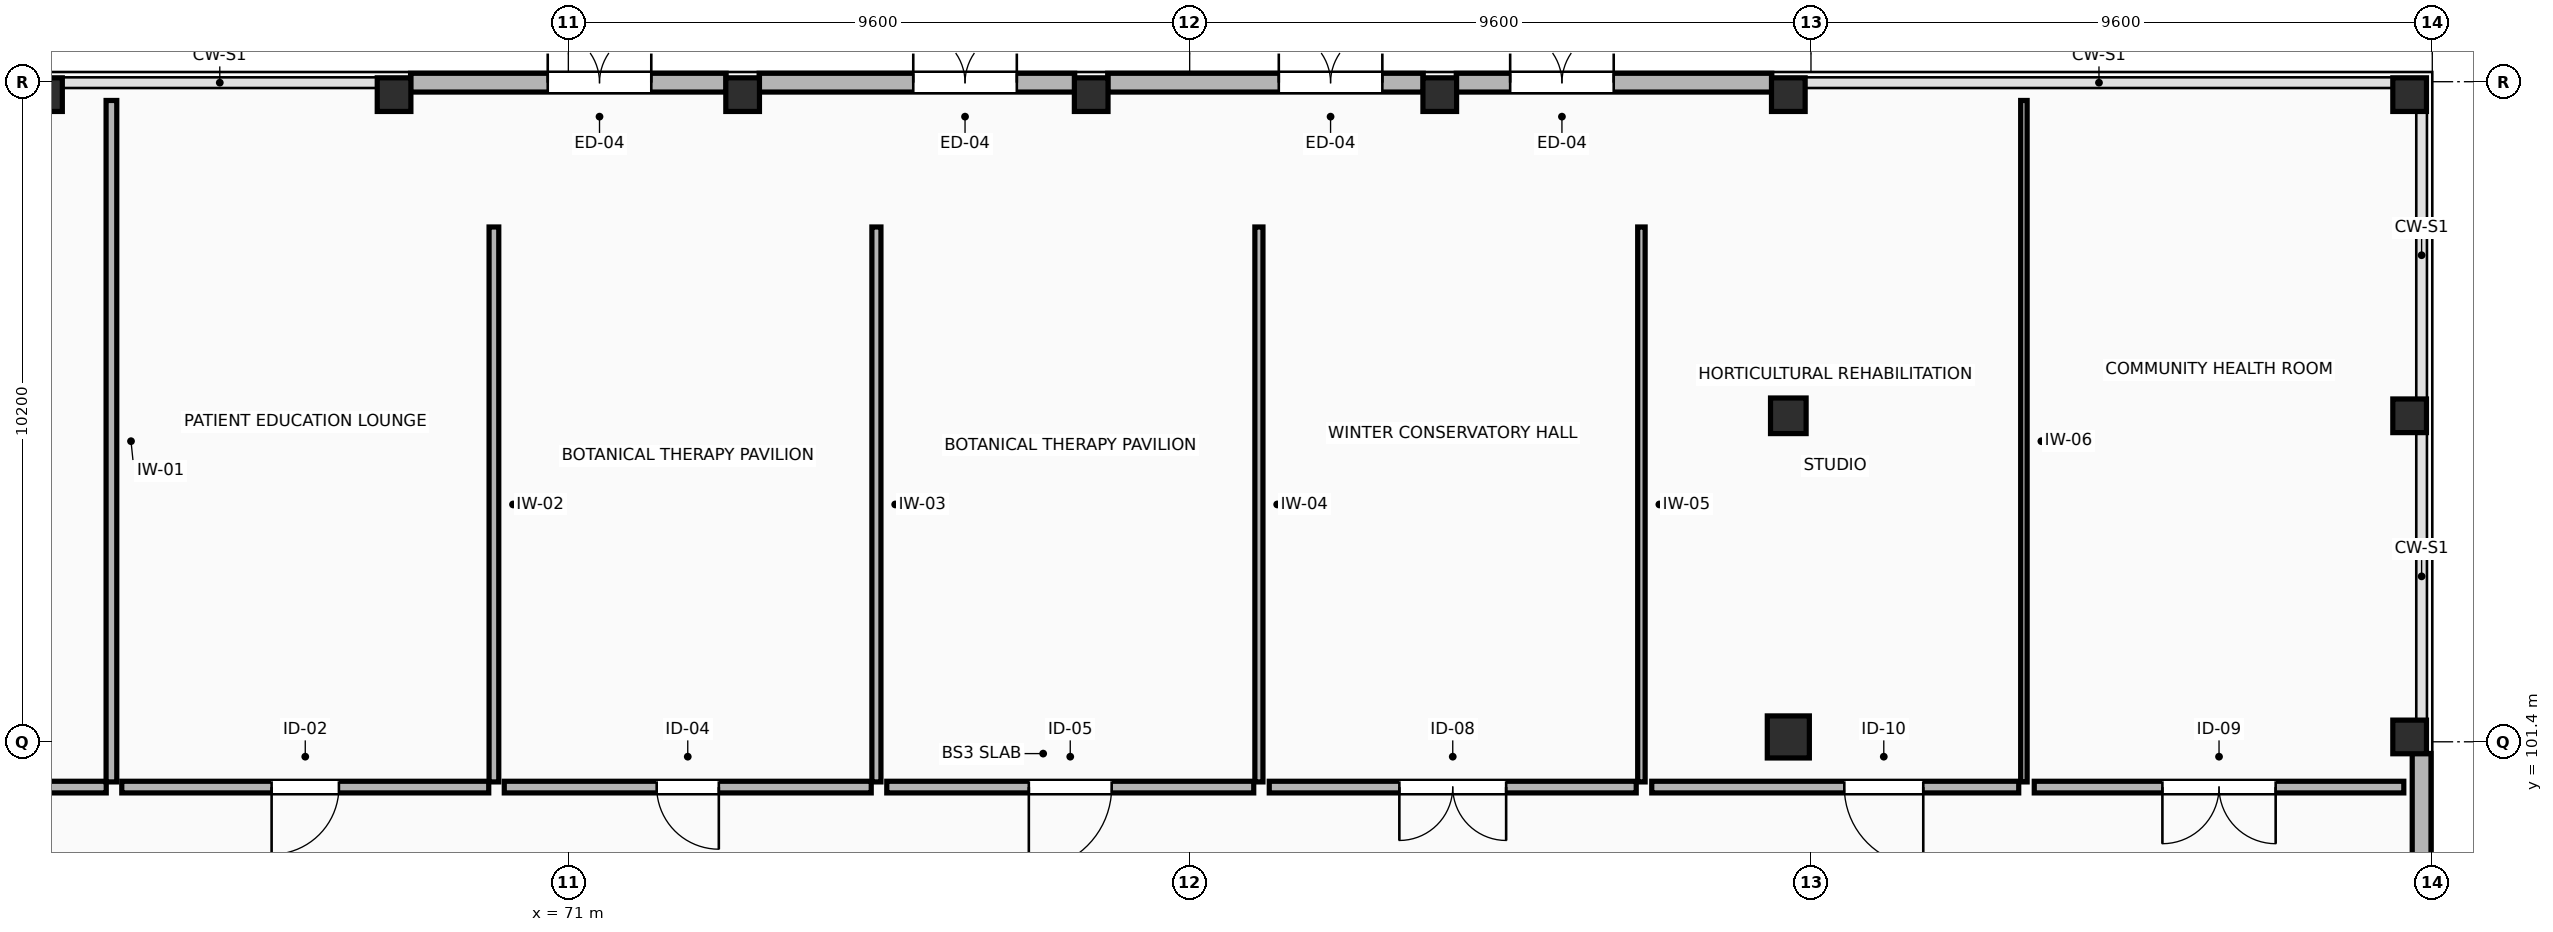
"""IFC4 building model, lengths in metres.
Left out: names, types, materials, properties, quantities, classifications, styles, units other than length and angle.
Written with IfcOpenShell. Run it as: python <this file> out.ifc"""

import sys

from ifc_helpers import new_model, si_unit, direction, frame, frame_2d, origin, origin_2d, place, context, subcontext, project, spatial, rectangle, circle, extrude, element, fill, save


model = new_model("IFC4")
c1 = context("Model", 3, precision=1e-05, world=origin(), true_north=direction((0.0, 1.0)))
c2 = subcontext(c1, "Body", "Model", "MODEL_VIEW")
j1 = project(units=[si_unit("LENGTHUNIT", "METRE"), si_unit("PLANEANGLEUNIT", "RADIAN")], contexts=[c1])
p1 = place(None, origin())
s1 = spatial("IfcSite", under=j1, at=p1, CompositionType="ELEMENT")
p2 = place(p1, origin())
s2 = spatial("IfcBuilding", under=s1, at=p2, CompositionType="ELEMENT")
p3 = place(p2, origin())
s3 = spatial("IfcBuildingStorey", under=s2, at=p3, CompositionType="ELEMENT", Elevation=0.0)
for number, where, z_axis, x_axis in (
    (1, (62.921, 111.4, -1.75), (0.0, 0.0, 1.0), (1.0, 0.0, 0.0)),
    (2, (68.307, 111.4, -1.75), (0.0, 0.0, 1.0), (1.0, 0.0, 0.0)),
    (3, (73.693, 111.4, -1.75), (0.0, 0.0, 1.0), (1.0, 0.0, 0.0)),
    (4, (79.079, 111.4, -1.75), (0.0, 0.0, 1.0), (1.0, 0.0, 0.0)),
    (5, (84.464, 111.4, -1.75), (0.0, 0.0, 1.0), (1.0, 0.0, 0.0)),
):
    element("IfcColumn", number, at=place(p3, frame(where, z_axis=z_axis, x_axis=x_axis)), inside=s3, PredefinedType="COLUMN", context=c2, shape_type="SweptSolid", body=[
        extrude(circle(Radius=0.26, at=origin_2d()), origin(), (0.0, 0.0, 1.0), 7.15),
    ])
p4 = place(p3, frame((89.85, 101.475, -1.75), z_axis=(0.0, 0.0, 1.0), x_axis=(1.0, 0.0, 0.0)))
e6 = element("IfcColumn", 6, at=p4, inside=s3, PredefinedType="COLUMN", context=c2, shape_type="SweptSolid", body=[
    extrude(rectangle(XDim=0.65, YDim=0.65, at=origin_2d()), origin(), (0.0, 0.0, 1.0), 7.15),
])
p5 = place(p3, frame((89.85, 106.438, -1.75), z_axis=(0.0, 0.0, 1.0), x_axis=(1.0, 0.0, 0.0)))
e7 = element("IfcColumn", 7, at=p5, inside=s3, PredefinedType="COLUMN", context=c2, shape_type="SweptSolid", body=[
    extrude(rectangle(XDim=0.55, YDim=0.55, at=origin_2d()), origin(), (0.0, 0.0, 1.0), 7.15),
])
for number, where, z_axis, x_axis in (
    (8, (89.85, 111.4, -1.75), (0.0, 0.0, 1.0), (1.0, 0.0, 0.0)),
    (9, (99.45, 101.475, -1.75), (0.0, 0.0, 1.0), (1.0, 0.0, 0.0)),
    (10, (99.45, 106.438, -1.75), (0.0, 0.0, 1.0), (1.0, 0.0, 0.0)),
    (11, (99.45, 111.4, -1.75), (0.0, 0.0, 1.0), (1.0, 0.0, 0.0)),
):
    element("IfcColumn", number, at=place(p3, frame(where, z_axis=z_axis, x_axis=x_axis)), inside=s3, PredefinedType="COLUMN", context=c2, shape_type="SweptSolid", body=[
        extrude(circle(Radius=0.26, at=origin_2d()), origin(), (0.0, 0.0, 1.0), 7.15),
    ])
p6 = place(p3, frame((99.635, 96.768, 0.0), z_axis=(0.0, 0.0, 1.0), x_axis=(0.0, 1.0, 0.0)))
e12 = element("IfcWall", 12, at=p6, inside=s3, PredefinedType="STANDARD", context=c2, shape_type="SweptSolid", body=[
    extrude(rectangle(XDim=4.452, YDim=0.29, at=frame_2d((2.226, 0.0))), origin(), (0.0, 0.0, 1.0), 4.67),
])
p7 = place(p3, frame((89.595, 111.585, 0.0), z_axis=(0.0, 0.0, 1.0), x_axis=(-1.0, 0.0, 0.0)))
e13 = element("IfcWall", 13, at=p7, inside=s3, PredefinedType="STANDARD", context=c2, shape_type="SweptSolid", body=[
    extrude(rectangle(XDim=4.876, YDim=0.29, at=frame_2d((2.438, 0.0))), origin(), (0.0, 0.0, 1.0), 4.265),
])
p8 = place(p7, frame((2.443, 0.0, 0.0)))
e14 = element("IfcOpeningElement", 14, at=p8, cuts=e13, PredefinedType="OPENING", context=c2, shape_type="SweptSolid", body=[
    extrude(rectangle(XDim=1.6, YDim=2.25, at=frame_2d((0.8, 1.125))), frame((0.0, 0.155, 0.0), z_axis=(0.0, -1.0, 0.0), x_axis=(1.0, 0.0, 0.0)), (0.0, 0.0, 1.0), 0.31),
])
p9 = place(p3, frame((84.209, 111.585, 0.0), z_axis=(0.0, 0.0, 1.0), x_axis=(-1.0, 0.0, 0.0)))
e15 = element("IfcWall", 15, at=p9, inside=s3, PredefinedType="STANDARD", context=c2, shape_type="SweptSolid", body=[
    extrude(rectangle(XDim=4.876, YDim=0.29, at=frame_2d((2.438, 0.0))), origin(), (0.0, 0.0, 1.0), 5.125),
])
p10 = place(p9, frame((0.632, 0.0, 0.0)))
e16 = element("IfcOpeningElement", 16, at=p10, cuts=e15, PredefinedType="OPENING", context=c2, shape_type="SweptSolid", body=[
    extrude(rectangle(XDim=1.6, YDim=2.25, at=frame_2d((0.8, 1.125))), frame((0.0, 0.155, 0.0), z_axis=(0.0, -1.0, 0.0), x_axis=(1.0, 0.0, 0.0)), (0.0, 0.0, 1.0), 0.31),
])
p11 = place(p3, frame((78.823, 111.585, 0.0), z_axis=(0.0, 0.0, 1.0), x_axis=(-1.0, 0.0, 0.0)))
e17 = element("IfcWall", 17, at=p11, inside=s3, PredefinedType="STANDARD", context=c2, shape_type="SweptSolid", body=[
    extrude(rectangle(XDim=4.875, YDim=0.29, at=frame_2d((2.438, 0.0))), origin(), (0.0, 0.0, 1.0), 5.125),
])
p12 = place(p11, frame((0.894, 0.0, 0.0)))
e18 = element("IfcOpeningElement", 18, at=p12, cuts=e17, PredefinedType="OPENING", context=c2, shape_type="SweptSolid", body=[
    extrude(rectangle(XDim=1.6, YDim=2.25, at=frame_2d((0.8, 1.125))), frame((0.0, 0.155, 0.0), z_axis=(0.0, -1.0, 0.0), x_axis=(1.0, 0.0, 0.0)), (0.0, 0.0, 1.0), 0.31),
])
p13 = place(p3, frame((73.438, 111.585, 0.0), z_axis=(0.0, 0.0, 1.0), x_axis=(-1.0, 0.0, 0.0)))
e19 = element("IfcWall", 19, at=p13, inside=s3, PredefinedType="STANDARD", context=c2, shape_type="SweptSolid", body=[
    extrude(rectangle(XDim=4.876, YDim=0.29, at=frame_2d((2.438, 0.0))), origin(), (0.0, 0.0, 1.0), 5.125),
])
p14 = place(p13, frame((1.156, 0.0, 0.0)))
e20 = element("IfcOpeningElement", 20, at=p14, cuts=e19, PredefinedType="OPENING", context=c2, shape_type="SweptSolid", body=[
    extrude(rectangle(XDim=1.6, YDim=2.25, at=frame_2d((0.8, 1.125))), frame((0.0, 0.155, 0.0), z_axis=(0.0, -1.0, 0.0), x_axis=(1.0, 0.0, 0.0)), (0.0, 0.0, 1.0), 0.31),
])
p15 = place(p3, frame((63.86, 100.7, 0.0), z_axis=(0.0, 0.0, 1.0), x_axis=(-1.0, 0.0, 0.0)))
e21 = element("IfcWall", 21, at=p15, inside=s3, PredefinedType="PARTITIONING", context=c2, shape_type="SweptSolid", body=[
    extrude(rectangle(XDim=5.67, YDim=0.18, at=frame_2d((2.835, 0.0))), origin(), (0.0, 0.0, 1.0), 5.125),
])
p16 = place(p15, frame((1.96, 0.0, 0.0)))
e22 = element("IfcOpeningElement", 22, at=p16, cuts=e21, PredefinedType="OPENING", context=c2, shape_type="SweptSolid", body=[
    extrude(rectangle(XDim=1.75, YDim=2.35, at=frame_2d((0.875, 1.175))), frame((0.0, 0.1, 0.0), z_axis=(0.0, -1.0, 0.0), x_axis=(1.0, 0.0, 0.0)), (0.0, 0.0, 1.0), 0.2),
])
p17 = place(p3, frame((63.94, 111.31, 0.0), z_axis=(0.0, 0.0, 1.0), x_axis=(0.0, -1.0, 0.0)))
e23 = element("IfcWall", 23, at=p17, inside=s3, PredefinedType="PARTITIONING", context=c2, shape_type="SweptSolid", body=[
    extrude(rectangle(XDim=10.53, YDim=0.165, at=frame_2d((5.265, 0.0))), origin(), (0.0, 0.0, 1.0), 5.125),
])
p18 = place(p3, frame((69.77, 100.7, 0.0), z_axis=(0.0, 0.0, 1.0), x_axis=(-1.0, 0.0, 0.0)))
e24 = element("IfcWall", 24, at=p18, inside=s3, PredefinedType="PARTITIONING", context=c2, shape_type="SweptSolid", body=[
    extrude(rectangle(XDim=5.67, YDim=0.18, at=frame_2d((2.835, 0.0))), origin(), (0.0, 0.0, 1.0), 5.125),
])
p19 = place(p18, frame((2.315, 0.0, 0.0)))
e25 = element("IfcOpeningElement", 25, at=p19, cuts=e24, PredefinedType="OPENING", context=c2, shape_type="SweptSolid", body=[
    extrude(rectangle(XDim=1.04, YDim=2.15, at=frame_2d((0.52, 1.075))), frame((0.0, 0.1, 0.0), z_axis=(0.0, -1.0, 0.0), x_axis=(1.0, 0.0, 0.0)), (0.0, 0.0, 1.0), 0.2),
])
p20 = place(p3, frame((69.85, 109.355, 0.0), z_axis=(0.0, 0.0, 1.0), x_axis=(0.0, -1.0, 0.0)))
e26 = element("IfcWall", 26, at=p20, inside=s3, PredefinedType="PARTITIONING", context=c2, shape_type="SweptSolid", body=[
    extrude(rectangle(XDim=8.575, YDim=0.15, at=frame_2d((4.288, 0.0))), origin(), (0.0, 0.0, 1.0), 5.125),
])
p21 = place(p3, frame((75.68, 100.7, 0.0), z_axis=(0.0, 0.0, 1.0), x_axis=(-1.0, 0.0, 0.0)))
e27 = element("IfcWall", 27, at=p21, inside=s3, PredefinedType="PARTITIONING", context=c2, shape_type="SweptSolid", body=[
    extrude(rectangle(XDim=5.67, YDim=0.18, at=frame_2d((2.835, 0.0))), origin(), (0.0, 0.0, 1.0), 5.125),
])
p22 = place(p21, frame((2.355, 0.0, 0.0)))
e28 = element("IfcOpeningElement", 28, at=p22, cuts=e27, PredefinedType="OPENING", context=c2, shape_type="SweptSolid", body=[
    extrude(rectangle(XDim=0.96, YDim=2.1, at=frame_2d((0.48, 1.05))), frame((0.0, 0.1, 0.0), z_axis=(0.0, -1.0, 0.0), x_axis=(1.0, 0.0, 0.0)), (0.0, 0.0, 1.0), 0.2),
])
p23 = place(p3, frame((75.76, 109.355, 0.0), z_axis=(0.0, 0.0, 1.0), x_axis=(0.0, -1.0, 0.0)))
e29 = element("IfcWall", 29, at=p23, inside=s3, PredefinedType="PARTITIONING", context=c2, shape_type="SweptSolid", body=[
    extrude(rectangle(XDim=8.575, YDim=0.14, at=frame_2d((4.288, 0.0))), origin(), (0.0, 0.0, 1.0), 5.125),
])
p24 = place(p3, frame((81.59, 100.7, 0.0), z_axis=(0.0, 0.0, 1.0), x_axis=(-1.0, 0.0, 0.0)))
e30 = element("IfcWall", 30, at=p24, inside=s3, PredefinedType="PARTITIONING", context=c2, shape_type="SweptSolid", body=[
    extrude(rectangle(XDim=5.67, YDim=0.18, at=frame_2d((2.835, 0.0))), origin(), (0.0, 0.0, 1.0), 5.125),
])
p25 = place(p24, frame((2.195, 0.0, 0.0)))
e31 = element("IfcOpeningElement", 31, at=p25, cuts=e30, PredefinedType="OPENING", context=c2, shape_type="SweptSolid", body=[
    extrude(rectangle(XDim=1.28, YDim=2.25, at=frame_2d((0.64, 1.125))), frame((0.0, 0.1, 0.0), z_axis=(0.0, -1.0, 0.0), x_axis=(1.0, 0.0, 0.0)), (0.0, 0.0, 1.0), 0.2),
])
p26 = place(p3, frame((81.67, 109.355, 0.0), z_axis=(0.0, 0.0, 1.0), x_axis=(0.0, -1.0, 0.0)))
e32 = element("IfcWall", 32, at=p26, inside=s3, PredefinedType="PARTITIONING", context=c2, shape_type="SweptSolid", body=[
    extrude(rectangle(XDim=8.575, YDim=0.125, at=frame_2d((4.288, 0.0))), origin(), (0.0, 0.0, 1.0), 5.125),
])
p27 = place(p3, frame((87.5, 100.7, 0.0), z_axis=(0.0, 0.0, 1.0), x_axis=(-1.0, 0.0, 0.0)))
e33 = element("IfcWall", 33, at=p27, inside=s3, PredefinedType="PARTITIONING", context=c2, shape_type="SweptSolid", body=[
    extrude(rectangle(XDim=5.67, YDim=0.18, at=frame_2d((2.835, 0.0))), origin(), (0.0, 0.0, 1.0), 5.125),
])
p28 = place(p27, frame((2.01, 0.0, 0.0)))
e34 = element("IfcOpeningElement", 34, at=p28, cuts=e33, PredefinedType="OPENING", context=c2, shape_type="SweptSolid", body=[
    extrude(rectangle(XDim=1.65, YDim=2.3, at=frame_2d((0.825, 1.15))), frame((0.0, 0.1, 0.0), z_axis=(0.0, -1.0, 0.0), x_axis=(1.0, 0.0, 0.0)), (0.0, 0.0, 1.0), 0.2),
])
p29 = place(p3, frame((87.58, 109.355, 0.0), z_axis=(0.0, 0.0, 1.0), x_axis=(0.0, -1.0, 0.0)))
e35 = element("IfcWall", 35, at=p29, inside=s3, PredefinedType="PARTITIONING", context=c2, shape_type="SweptSolid", body=[
    extrude(rectangle(XDim=8.575, YDim=0.115, at=frame_2d((4.288, 0.0))), origin(), (0.0, 0.0, 1.0), 5.125),
])
p30 = place(p3, frame((93.41, 100.7, 0.0), z_axis=(0.0, 0.0, 1.0), x_axis=(-1.0, 0.0, 0.0)))
e36 = element("IfcWall", 36, at=p30, inside=s3, PredefinedType="PARTITIONING", context=c2, shape_type="SweptSolid", body=[
    extrude(rectangle(XDim=5.67, YDim=0.18, at=frame_2d((2.835, 0.0))), origin(), (0.0, 0.0, 1.0), 5.125),
])
p31 = place(p30, frame((1.475, 0.0, 0.0)))
e37 = element("IfcOpeningElement", 37, at=p31, cuts=e36, PredefinedType="OPENING", context=c2, shape_type="SweptSolid", body=[
    extrude(rectangle(XDim=1.22, YDim=2.18, at=frame_2d((0.61, 1.09))), frame((0.0, 0.1, 0.0), z_axis=(0.0, -1.0, 0.0), x_axis=(1.0, 0.0, 0.0)), (0.0, 0.0, 1.0), 0.2),
])
p32 = place(p3, frame((93.49, 111.31, 0.0), z_axis=(0.0, 0.0, 1.0), x_axis=(0.0, -1.0, 0.0)))
e38 = element("IfcWall", 38, at=p32, inside=s3, PredefinedType="PARTITIONING", context=c2, shape_type="SweptSolid", body=[
    extrude(rectangle(XDim=10.53, YDim=0.1, at=frame_2d((5.265, 0.0))), origin(), (0.0, 0.0, 1.0), 5.125),
])
p33 = place(p3, frame((99.36, 100.7, 0.0), z_axis=(0.0, 0.0, 1.0), x_axis=(-1.0, 0.0, 0.0)))
e39 = element("IfcWall", 39, at=p33, inside=s3, PredefinedType="PARTITIONING", context=c2, shape_type="SweptSolid", body=[
    extrude(rectangle(XDim=5.71, YDim=0.18, at=frame_2d((2.855, 0.0))), origin(), (0.0, 0.0, 1.0), 5.125),
])
p34 = place(p33, frame((1.98, 0.0, 0.0)))
e40 = element("IfcOpeningElement", 40, at=p34, cuts=e39, PredefinedType="OPENING", context=c2, shape_type="SweptSolid", body=[
    extrude(rectangle(XDim=1.75, YDim=2.35, at=frame_2d((0.875, 1.175))), frame((0.0, 0.1, 0.0), z_axis=(0.0, -1.0, 0.0), x_axis=(1.0, 0.0, 0.0)), (0.0, 0.0, 1.0), 0.2),
])
p35 = place(p8, frame((1.6, 0.0, 0.0), z_axis=(0.0, 0.0, 1.0), x_axis=(-1.0, 0.0, 0.0)))
e41 = element("IfcDoor", 41, at=p35, inside=s3, OperationType="DOUBLE_DOOR_SINGLE_SWING", PredefinedType="DOOR", context=c2, shape_type="SweptSolid", body=[
    extrude(rectangle(XDim=1.6, YDim=2.25, at=frame_2d((0.8, 1.125))), frame((0.0, 0.025, 0.0), z_axis=(0.0, -1.0, 0.0), x_axis=(1.0, 0.0, 0.0)), (0.0, 0.0, 1.0), 0.05),
])
fill(e14, e41)
p36 = place(p10, frame((1.6, 0.0, 0.0), z_axis=(0.0, 0.0, 1.0), x_axis=(-1.0, 0.0, 0.0)))
e42 = element("IfcDoor", 42, at=p36, inside=s3, OperationType="DOUBLE_DOOR_SINGLE_SWING", PredefinedType="DOOR", context=c2, shape_type="SweptSolid", body=[
    extrude(rectangle(XDim=1.6, YDim=2.25, at=frame_2d((0.8, 1.125))), frame((0.0, 0.025, 0.0), z_axis=(0.0, -1.0, 0.0), x_axis=(1.0, 0.0, 0.0)), (0.0, 0.0, 1.0), 0.05),
])
fill(e16, e42)
p37 = place(p12, frame((1.6, 0.0, 0.0), z_axis=(0.0, 0.0, 1.0), x_axis=(-1.0, 0.0, 0.0)))
e43 = element("IfcDoor", 43, at=p37, inside=s3, OperationType="DOUBLE_DOOR_SINGLE_SWING", PredefinedType="DOOR", context=c2, shape_type="SweptSolid", body=[
    extrude(rectangle(XDim=1.6, YDim=2.25, at=frame_2d((0.8, 1.125))), frame((0.0, 0.025, 0.0), z_axis=(0.0, -1.0, 0.0), x_axis=(1.0, 0.0, 0.0)), (0.0, 0.0, 1.0), 0.05),
])
fill(e18, e43)
p38 = place(p14, frame((1.6, 0.0, 0.0), z_axis=(0.0, 0.0, 1.0), x_axis=(-1.0, 0.0, 0.0)))
e44 = element("IfcDoor", 44, at=p38, inside=s3, OperationType="DOUBLE_DOOR_SINGLE_SWING", PredefinedType="DOOR", context=c2, shape_type="SweptSolid", body=[
    extrude(rectangle(XDim=1.6, YDim=2.25, at=frame_2d((0.8, 1.125))), frame((0.0, 0.025, 0.0), z_axis=(0.0, -1.0, 0.0), x_axis=(1.0, 0.0, 0.0)), (0.0, 0.0, 1.0), 0.05),
])
fill(e20, e44)
p39 = place(p19, origin())
e45 = element("IfcDoor", 45, at=p39, inside=s3, OperationType="SINGLE_SWING_RIGHT", PredefinedType="DOOR", context=c2, shape_type="SweptSolid", body=[
    extrude(rectangle(XDim=1.04, YDim=2.15, at=frame_2d((0.52, 1.075))), frame((0.0, 0.025, 0.0), z_axis=(0.0, -1.0, 0.0), x_axis=(1.0, 0.0, 0.0)), (0.0, 0.0, 1.0), 0.05),
])
fill(e25, e45)
p40 = place(p22, origin())
e46 = element("IfcDoor", 46, at=p40, inside=s3, OperationType="SINGLE_SWING_LEFT", PredefinedType="DOOR", context=c2, shape_type="SweptSolid", body=[
    extrude(rectangle(XDim=0.96, YDim=2.1, at=frame_2d((0.48, 1.05))), frame((0.0, 0.025, 0.0), z_axis=(0.0, -1.0, 0.0), x_axis=(1.0, 0.0, 0.0)), (0.0, 0.0, 1.0), 0.05),
])
fill(e28, e46)
p41 = place(p25, origin())
e47 = element("IfcDoor", 47, at=p41, inside=s3, OperationType="SINGLE_SWING_RIGHT", PredefinedType="DOOR", context=c2, shape_type="SweptSolid", body=[
    extrude(rectangle(XDim=1.28, YDim=2.25, at=frame_2d((0.64, 1.125))), frame((0.0, 0.025, 0.0), z_axis=(0.0, -1.0, 0.0), x_axis=(1.0, 0.0, 0.0)), (0.0, 0.0, 1.0), 0.05),
])
fill(e31, e47)
p42 = place(p28, origin())
e48 = element("IfcDoor", 48, at=p42, inside=s3, OperationType="DOUBLE_DOOR_SINGLE_SWING", PredefinedType="DOOR", context=c2, shape_type="SweptSolid", body=[
    extrude(rectangle(XDim=1.65, YDim=2.3, at=frame_2d((0.825, 1.15))), frame((0.0, 0.025, 0.0), z_axis=(0.0, -1.0, 0.0), x_axis=(1.0, 0.0, 0.0)), (0.0, 0.0, 1.0), 0.05),
])
fill(e34, e48)
p43 = place(p31, origin())
e49 = element("IfcDoor", 49, at=p43, inside=s3, OperationType="SINGLE_SWING_LEFT", PredefinedType="DOOR", context=c2, shape_type="SweptSolid", body=[
    extrude(rectangle(XDim=1.22, YDim=2.18, at=frame_2d((0.61, 1.09))), frame((0.0, 0.025, 0.0), z_axis=(0.0, -1.0, 0.0), x_axis=(1.0, 0.0, 0.0)), (0.0, 0.0, 1.0), 0.05),
])
fill(e37, e49)
p44 = place(p34, origin())
e50 = element("IfcDoor", 50, at=p44, inside=s3, OperationType="DOUBLE_DOOR_SINGLE_SWING", PredefinedType="DOOR", context=c2, shape_type="SweptSolid", body=[
    extrude(rectangle(XDim=1.75, YDim=2.35, at=frame_2d((0.875, 1.175))), frame((0.0, 0.025, 0.0), z_axis=(0.0, -1.0, 0.0), x_axis=(1.0, 0.0, 0.0)), (0.0, 0.0, 1.0), 0.05),
])
fill(e40, e50)
save(model, sys.argv[1])
